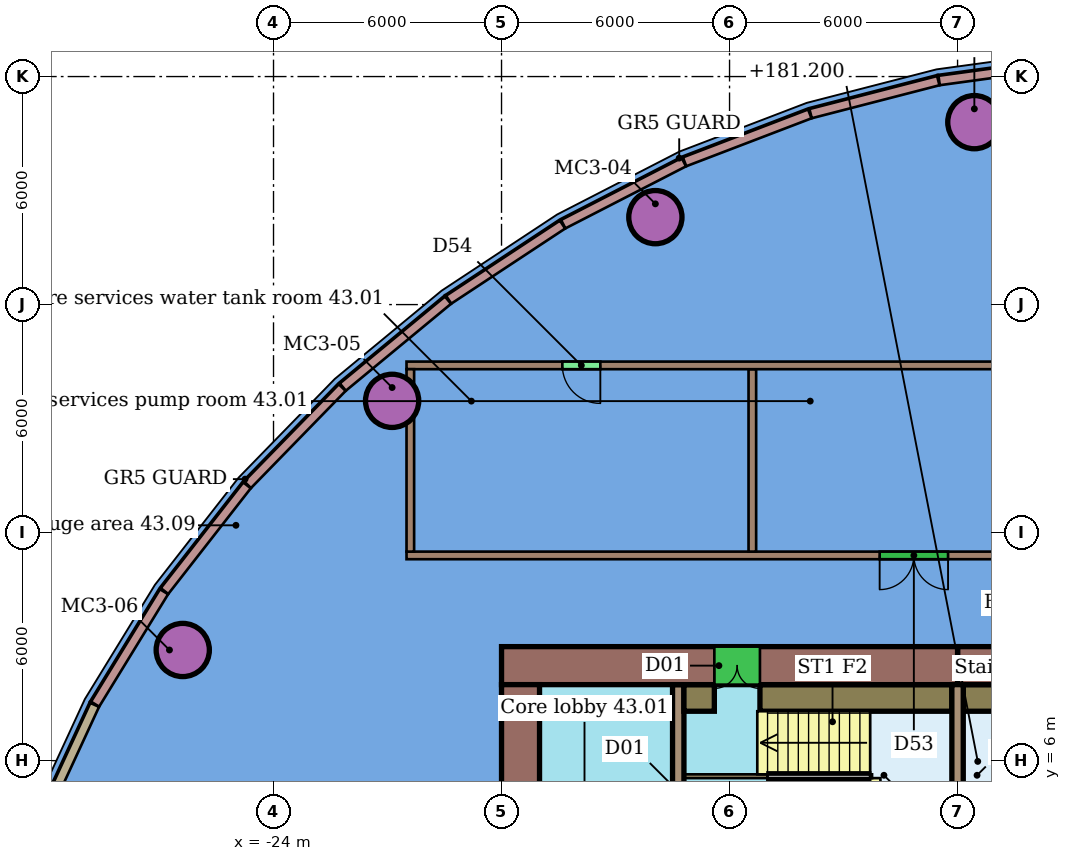
"""IFC4 building model, lengths in metres.
Left out: names, types, materials, properties, quantities, classifications, styles, units other than length and angle.
Written with IfcOpenShell. Run it as: python <this file> out.ifc"""

import sys

from ifc_helpers import new_model, si_unit, direction, frame, frame_2d, origin, origin_2d, place, context, subcontext, project, spatial, rectangle, hollow_circle, extrude, element, fill, save


model = new_model("IFC4")
c1 = context("Model", 3, precision=1e-05, world=origin(), true_north=direction((0.0, 1.0)))
c2 = subcontext(c1, "Body", "Model", "MODEL_VIEW")
j1 = project(units=[si_unit("LENGTHUNIT", "METRE"), si_unit("PLANEANGLEUNIT", "RADIAN")], contexts=[c1])
p1 = place(None, origin())
s1 = spatial("IfcSite", under=j1, at=p1, CompositionType="ELEMENT")
p2 = place(p1, origin())
s2 = spatial("IfcBuilding", under=s1, at=p2, CompositionType="ELEMENT")
p3 = place(p2, frame((0.0, 0.0, 179.4)))
s3 = spatial("IfcBuildingStorey", under=s2, at=p3, CompositionType="ELEMENT", Elevation=179.4)
for number, where, z_axis, x_axis in (
    (1, (-5.558, 22.8, 0.0), (0.0, 0.0, 1.0), (1.0, 0.0, 0.0)),
    (2, (-13.952, 20.301, 0.0), (0.0, 0.0, 1.0), (1.0, 0.0, 0.0)),
    (3, (-20.879, 15.467, 0.0), (0.0, 0.0, 1.0), (1.0, 0.0, 0.0)),
    (4, (-26.388, 8.912, 0.0), (0.0, 0.0, 1.0), (1.0, 0.0, 0.0)),
):
    element("IfcColumn", number, at=place(p3, frame(where, z_axis=z_axis, x_axis=x_axis)), inside=s3, PredefinedType="COLUMN", context=c2, shape_type="SweptSolid", body=[
        extrude(hollow_circle(Radius=0.7, WallThickness=0.05, at=origin_2d()), origin(), (0.0, 0.0, 1.0), 3.45),
    ])
p4 = place(p3, frame((-2.8, 11.4, 0.0), z_axis=(0.0, 0.0, 1.0), x_axis=(-1.0, 0.0, 0.0)))
e5 = element("IfcWall", 5, at=p4, inside=s3, PredefinedType="PARTITIONING", context=c2, shape_type="SweptSolid", body=[
    extrude(rectangle(XDim=17.7, YDim=0.2, at=frame_2d((8.85, 0.0))), origin(), (0.0, 0.0, 1.0), 2.862),
])
p5 = place(p4, frame((3.45, 0.0, 0.0)))
e6 = element("IfcOpeningElement", 6, at=p5, cuts=e5, PredefinedType="OPENING", context=c2, shape_type="SweptSolid", body=[
    extrude(rectangle(XDim=1.8, YDim=2.4, at=frame_2d((0.9, 1.2))), frame((0.0, 0.11, 0.0), z_axis=(0.0, -1.0, 0.0), x_axis=(1.0, 0.0, 0.0)), (0.0, 0.0, 1.0), 0.22),
])
p6 = place(p3, frame((-11.4, 11.5, 0.0), z_axis=(0.0, 0.0, 1.0), x_axis=(0.0, 1.0, 0.0)))
e7 = element("IfcWall", 7, at=p6, inside=s3, PredefinedType="PARTITIONING", context=c2, shape_type="SweptSolid", body=[
    extrude(rectangle(XDim=4.8, YDim=0.2, at=frame_2d((2.4, 0.0))), origin(), (0.0, 0.0, 1.0), 2.862),
])
p7 = place(p3, frame((-2.8, 16.4, 0.0), z_axis=(0.0, 0.0, 1.0), x_axis=(-1.0, 0.0, 0.0)))
e8 = element("IfcWall", 8, at=p7, inside=s3, PredefinedType="PARTITIONING", context=c2, shape_type="SweptSolid", body=[
    extrude(rectangle(XDim=17.7, YDim=0.2, at=frame_2d((8.85, 0.0))), origin(), (0.0, 0.0, 1.0), 2.862),
])
p8 = place(p7, frame((12.6, 0.0, 0.0)))
e9 = element("IfcOpeningElement", 9, at=p8, cuts=e8, PredefinedType="OPENING", context=c2, shape_type="SweptSolid", body=[
    extrude(rectangle(XDim=1.0, YDim=2.1, at=frame_2d((0.5, 1.05))), frame((0.0, 0.11, 0.0), z_axis=(0.0, -1.0, 0.0), x_axis=(1.0, 0.0, 0.0)), (0.0, 0.0, 1.0), 0.22),
])
p9 = place(p3, frame((-20.4, 11.5, 0.0), z_axis=(0.0, 0.0, 1.0), x_axis=(0.0, 1.0, 0.0)))
e10 = element("IfcWall", 10, at=p9, inside=s3, PredefinedType="PARTITIONING", context=c2, shape_type="SweptSolid", body=[
    extrude(rectangle(XDim=4.8, YDim=0.2, at=frame_2d((2.4, 0.0))), origin(), (0.0, 0.0, 1.0), 2.862),
])
p10 = place(p3, frame((-3.119, 24.356, 0.0), z_axis=(0.0, 0.0, 1.0), x_axis=(-0.990801720843, -0.135321653757, 0.0)))
e11 = element("IfcWall", 11, at=p10, inside=s3, PredefinedType="SOLIDWALL", context=c2, shape_type="SweptSolid", body=[
    extrude(rectangle(XDim=3.397, YDim=0.25, at=frame_2d((1.699, 0.0))), origin(), (0.0, 0.0, 1.0), 3.1),
])
p11 = place(p3, frame((-6.507, 23.892, 0.0), z_axis=(0.0, 0.0, 1.0), x_axis=(-0.968247112596, -0.249995057849, 0.0)))
e12 = element("IfcWall", 12, at=p11, inside=s3, PredefinedType="SOLIDWALL", context=c2, shape_type="SweptSolid", body=[
    extrude(rectangle(XDim=3.47, YDim=0.25, at=frame_2d((1.735, 0.0))), origin(), (0.0, 0.0, 1.0), 3.1),
])
p12 = place(p3, frame((-9.888, 23.018, 0.0), z_axis=(0.0, 0.0, 1.0), x_axis=(-0.933996829101, -0.357281294262, 0.0)))
e13 = element("IfcWall", 13, at=p12, inside=s3, PredefinedType="SOLIDWALL", context=c2, shape_type="SweptSolid", body=[
    extrude(rectangle(XDim=3.528, YDim=0.25, at=frame_2d((1.764, 0.0))), origin(), (0.0, 0.0, 1.0), 3.1),
])
p13 = place(p3, frame((-13.203, 21.748, 0.0), z_axis=(0.0, 0.0, 1.0), x_axis=(-0.889237716381, -0.457445388833, 0.0)))
e14 = element("IfcWall", 14, at=p13, inside=s3, PredefinedType="SOLIDWALL", context=c2, shape_type="SweptSolid", body=[
    extrude(rectangle(XDim=3.569, YDim=0.25, at=frame_2d((1.784, 0.0))), origin(), (0.0, 0.0, 1.0), 3.1),
])
p14 = place(p3, frame((-16.395, 20.105, 0.0), z_axis=(0.0, 0.0, 1.0), x_axis=(-0.834771348856, -0.55059676273, 0.0)))
e15 = element("IfcWall", 15, at=p14, inside=s3, PredefinedType="SOLIDWALL", context=c2, shape_type="SweptSolid", body=[
    extrude(rectangle(XDim=3.589, YDim=0.25, at=frame_2d((1.795, 0.0))), origin(), (0.0, 0.0, 1.0), 3.1),
])
p15 = place(p3, frame((-19.409, 18.116, 0.0), z_axis=(0.0, 0.0, 1.0), x_axis=(-0.771012569009, -0.63681992622, 0.0)))
e16 = element("IfcWall", 16, at=p15, inside=s3, PredefinedType="SOLIDWALL", context=c2, shape_type="SweptSolid", body=[
    extrude(rectangle(XDim=3.59, YDim=0.25, at=frame_2d((1.795, 0.0))), origin(), (0.0, 0.0, 1.0), 3.1),
])
p16 = place(p3, frame((-22.192, 15.816, 0.0), z_axis=(0.0, 0.0, 1.0), x_axis=(-0.697915115283, -0.716180488326, 0.0)))
e17 = element("IfcWall", 17, at=p16, inside=s3, PredefinedType="SOLIDWALL", context=c2, shape_type="SweptSolid", body=[
    extrude(rectangle(XDim=3.569, YDim=0.25, at=frame_2d((1.784, 0.0))), origin(), (0.0, 0.0, 1.0), 3.1),
])
p17 = place(p3, frame((-24.697, 13.243, 0.0), z_axis=(0.0, 0.0, 1.0), x_axis=(-0.615333786545, -0.788266662454, 0.0)))
e18 = element("IfcWall", 18, at=p17, inside=s3, PredefinedType="SOLIDWALL", context=c2, shape_type="SweptSolid", body=[
    extrude(rectangle(XDim=3.528, YDim=0.25, at=frame_2d((1.764, 0.0))), origin(), (0.0, 0.0, 1.0), 3.1),
])
p18 = place(p3, frame((-26.88, 10.444, 0.0), z_axis=(0.0, 0.0, 1.0), x_axis=(-0.522769927115, -0.852473813853, 0.0)))
e19 = element("IfcWall", 19, at=p18, inside=s3, PredefinedType="SOLIDWALL", context=c2, shape_type="SweptSolid", body=[
    extrude(rectangle(XDim=3.47, YDim=0.25, at=frame_2d((1.735, 0.0))), origin(), (0.0, 0.0, 1.0), 3.1),
])
p19 = place(p3, frame((-28.705, 7.466, 0.0), z_axis=(0.0, 0.0, 1.0), x_axis=(-0.419696101817, -0.90766468595, 0.0)))
e20 = element("IfcWall", 20, at=p19, inside=s3, PredefinedType="SOLIDWALL", context=c2, shape_type="SweptSolid", body=[
    extrude(rectangle(XDim=3.397, YDim=0.25, at=frame_2d((1.699, 0.0))), origin(), (0.0, 0.0, 1.0), 3.45),
])
p20 = place(p3, frame((6.0, 8.5, 0.0), z_axis=(0.0, 0.0, 1.0), x_axis=(-1.0, 0.0, 0.0)))
e21 = element("IfcWall", 21, at=p20, inside=s3, PredefinedType="SHEAR", context=c2, shape_type="SweptSolid", body=[
    extrude(rectangle(XDim=12.0, YDim=1.0, at=frame_2d((6.0, 0.0))), origin(), (0.0, 0.0, 1.0), 3.3),
])
p21 = place(p20, frame((5.6, 0.0, 0.0)))
e22 = element("IfcOpeningElement", 22, at=p21, cuts=e21, PredefinedType="OPENING", context=c2, shape_type="SweptSolid", body=[
    extrude(rectangle(XDim=1.2, YDim=2.1, at=frame_2d((0.6, 1.05))), frame((0.0, 0.51, 0.0), z_axis=(0.0, -1.0, 0.0), x_axis=(1.0, 0.0, 0.0)), (0.0, 0.0, 1.0), 1.02),
])
p22 = place(p3, frame((-6.0, 8.5, 0.0), z_axis=(0.0, 0.0, 1.0), x_axis=(-1.0, 0.0, 0.0)))
e23 = element("IfcWall", 23, at=p22, inside=s3, PredefinedType="SHEAR", context=c2, shape_type="SweptSolid", body=[
    extrude(rectangle(XDim=12.0, YDim=1.0, at=frame_2d((6.0, 0.0))), origin(), (0.0, 0.0, 1.0), 3.3),
])
p23 = place(p22, frame((5.2, 0.0, 0.0)))
e24 = element("IfcOpeningElement", 24, at=p23, cuts=e23, PredefinedType="OPENING", context=c2, shape_type="SweptSolid", body=[
    extrude(rectangle(XDim=1.2, YDim=2.1, at=frame_2d((0.6, 1.05))), frame((0.0, 0.51, 0.0), z_axis=(0.0, -1.0, 0.0), x_axis=(1.0, 0.0, 0.0)), (0.0, 0.0, 1.0), 1.02),
])
p24 = place(p3, frame((-17.5, 8.0, 0.0), z_axis=(0.0, 0.0, 1.0), x_axis=(0.0, -1.0, 0.0)))
e25 = element("IfcWall", 25, at=p24, inside=s3, PredefinedType="SHEAR", context=c2, shape_type="SweptSolid", body=[
    extrude(rectangle(XDim=16.0, YDim=1.0, at=frame_2d((8.0, 0.0))), origin(), (0.0, 0.0, 1.0), 3.3),
])
p25 = place(p24, frame((11.9, 0.0, 0.0)))
e26 = element("IfcOpeningElement", 26, at=p25, cuts=e25, PredefinedType="OPENING", context=c2, shape_type="SweptSolid", body=[
    extrude(rectangle(XDim=1.2, YDim=2.1, at=frame_2d((0.6, 1.05))), frame((0.0, 0.51, 0.0), z_axis=(0.0, -1.0, 0.0), x_axis=(1.0, 0.0, 0.0)), (0.0, 0.0, 1.0), 1.02),
])
p26 = place(p24, frame((2.9, 0.0, 0.0)))
e27 = element("IfcOpeningElement", 27, at=p26, cuts=e25, PredefinedType="OPENING", context=c2, shape_type="SweptSolid", body=[
    extrude(rectangle(XDim=1.2, YDim=2.1, at=frame_2d((0.6, 1.05))), frame((0.0, 0.51, 0.0), z_axis=(0.0, -1.0, 0.0), x_axis=(1.0, 0.0, 0.0)), (0.0, 0.0, 1.0), 1.02),
])
p27 = place(p3, frame((-13.35, 8.0, 0.0), z_axis=(0.0, 0.0, 1.0), x_axis=(0.0, -1.0, 0.0)))
e28 = element("IfcWall", 28, at=p27, inside=s3, PredefinedType="SHEAR", context=c2, shape_type="SweptSolid", body=[
    extrude(rectangle(XDim=16.0, YDim=0.3, at=frame_2d((8.0, 0.0))), origin(), (0.0, 0.0, 1.0), 3.3),
])
p28 = place(p27, frame((2.69, 0.0, 0.0)))
e29 = element("IfcOpeningElement", 29, at=p28, cuts=e28, PredefinedType="OPENING", context=c2, shape_type="SweptSolid", body=[
    extrude(rectangle(XDim=1.2, YDim=2.1, at=frame_2d((0.6, 1.05))), frame((0.0, 0.16, 0.0), z_axis=(0.0, -1.0, 0.0), x_axis=(1.0, 0.0, 0.0)), (0.0, 0.0, 1.0), 0.32),
])
p29 = place(p27, frame((12.99, 0.0, 0.0)))
e30 = element("IfcOpeningElement", 30, at=p29, cuts=e28, PredefinedType="OPENING", context=c2, shape_type="SweptSolid", body=[
    extrude(rectangle(XDim=1.2, YDim=2.1, at=frame_2d((0.6, 1.05))), frame((0.0, 0.16, 0.0), z_axis=(0.0, -1.0, 0.0), x_axis=(1.0, 0.0, 0.0)), (0.0, 0.0, 1.0), 0.32),
])
p30 = place(p27, frame((7.25, 0.0, 0.0)))
e31 = element("IfcOpeningElement", 31, at=p30, cuts=e28, PredefinedType="OPENING", context=c2, shape_type="SweptSolid", body=[
    extrude(rectangle(XDim=1.5, YDim=2.1, at=frame_2d((0.75, 1.05))), frame((0.0, 0.16, 0.0), z_axis=(0.0, -1.0, 0.0), x_axis=(1.0, 0.0, 0.0)), (0.0, 0.0, 1.0), 0.32),
])
p31 = place(p3, frame((-6.0, 3.88, 0.0), z_axis=(0.0, 0.0, 1.0), x_axis=(0.0, 1.0, 0.0)))
e32 = element("IfcWall", 32, at=p31, inside=s3, PredefinedType="SHEAR", context=c2, shape_type="SweptSolid", body=[
    extrude(rectangle(XDim=4.12, YDim=0.3, at=frame_2d((2.06, 0.0))), origin(), (0.0, 0.0, 1.0), 3.3),
])
p32 = place(p3, frame((-13.2, 7.65, 0.0), z_axis=(0.0, 0.0, 1.0), x_axis=(1.0, 0.0, 0.0)))
e33 = element("IfcWall", 33, at=p32, inside=s3, PredefinedType="SHEAR", context=c2, shape_type="SweptSolid", body=[
    extrude(rectangle(XDim=0.8, YDim=0.7, at=frame_2d((0.4, 0.0))), origin(), (0.0, 0.0, 1.0), 3.3),
])
for number, where, z_axis, x_axis in (
    (34, (-11.2, 7.65, 0.0), (0.0, 0.0, 1.0), (1.0, 0.0, 0.0)),
    (35, (-5.85, 7.65, 0.0), (0.0, 0.0, 1.0), (1.0, 0.0, 0.0)),
):
    element("IfcWall", number, at=place(p3, frame(where, z_axis=z_axis, x_axis=x_axis)), inside=s3, PredefinedType="SHEAR", context=c2, shape_type="SweptSolid", body=[
        extrude(rectangle(XDim=5.05, YDim=0.7, at=frame_2d((2.525, 0.0))), origin(), (0.0, 0.0, 1.0), 3.3),
    ])
p33 = place(p3, frame((-13.2, 5.59, 0.0), z_axis=(0.0, 0.0, 1.0), x_axis=(1.0, 0.0, 0.0)))
e36 = element("IfcWall", 36, at=p33, inside=s3, PredefinedType="SHEAR", context=c2, shape_type="SweptSolid", body=[
    extrude(rectangle(XDim=2.2, YDim=0.1, at=frame_2d((1.1, 0.0))), origin(), (0.0, 0.0, 1.0), 3.3),
])
p34 = place(p5, origin())
e37 = element("IfcDoor", 37, at=p34, inside=s3, OperationType="DOUBLE_DOOR_SINGLE_SWING", PredefinedType="DOOR", context=c2, shape_type="SweptSolid", body=[
    extrude(rectangle(XDim=1.8, YDim=2.4, at=frame_2d((0.9, 1.2))), frame((0.0, 0.025, 0.0), z_axis=(0.0, -1.0, 0.0), x_axis=(1.0, 0.0, 0.0)), (0.0, 0.0, 1.0), 0.05),
])
fill(e6, e37)
p35 = place(p8, origin())
e38 = element("IfcDoor", 38, at=p35, inside=s3, OperationType="SINGLE_SWING_LEFT", PredefinedType="DOOR", context=c2, shape_type="SweptSolid", body=[
    extrude(rectangle(XDim=1.0, YDim=2.1, at=frame_2d((0.5, 1.05))), frame((0.0, 0.025, 0.0), z_axis=(0.0, -1.0, 0.0), x_axis=(1.0, 0.0, 0.0)), (0.0, 0.0, 1.0), 0.05),
])
fill(e9, e38)
p36 = place(p23, origin())
e39 = element("IfcDoor", 39, at=p36, inside=s3, OperationType="DOUBLE_DOOR_SINGLE_SWING", PredefinedType="NOTDEFINED", context=c2, shape_type="SweptSolid", body=[
    extrude(rectangle(XDim=1.2, YDim=2.1, at=frame_2d((0.6, 1.05))), frame((0.0, 0.025, 0.0), z_axis=(0.0, -1.0, 0.0), x_axis=(1.0, 0.0, 0.0)), (0.0, 0.0, 1.0), 0.05),
])
fill(e24, e39)
save(model, sys.argv[1])
